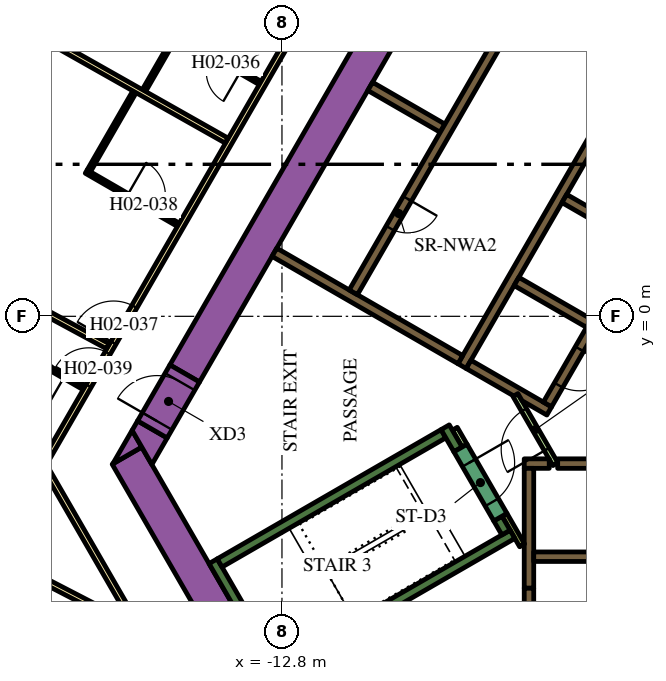
"""IFC4 building model, lengths in metres.
Left out: names, types, materials, properties, quantities, classifications, styles, units other than length and angle.
Written with IfcOpenShell. Run it as: python <this file> out.ifc"""

import sys

from ifc_helpers import new_model, si_unit, direction, frame, frame_2d, origin, place, context, subcontext, project, spatial, polyline, rectangle, outline, extrude, element, fill, save


model = new_model("IFC4")
c1 = context("Model", 3, precision=1e-05, world=origin(), true_north=direction((0.0, 1.0)))
c2 = subcontext(c1, "Body", "Model", "MODEL_VIEW")
j1 = project(units=[si_unit("LENGTHUNIT", "METRE"), si_unit("PLANEANGLEUNIT", "RADIAN")], contexts=[c1])
p1 = place(None, origin())
s1 = spatial("IfcSite", under=j1, at=p1, CompositionType="ELEMENT")
p2 = place(p1, origin())
s2 = spatial("IfcBuilding", under=s1, at=p2, CompositionType="ELEMENT")
p3 = place(p2, frame((0.0, 0.0, 39.3)))
s3 = spatial("IfcBuildingStorey", under=s2, at=p3, CompositionType="ELEMENT", Elevation=39.3)
p4 = place(p3, frame((-15.36, -1.503, 0.0), z_axis=(0.0, 0.0, 1.0), x_axis=(0.50000389221, 0.866023156604, 0.0)))
e1 = element("IfcWall", 1, at=p4, inside=s3, PredefinedType="SOLIDWALL", context=c2, shape_type="SweptSolid", body=[
    extrude(rectangle(XDim=21.0, YDim=0.9, at=frame_2d((10.5, 0.0))), origin(), (0.0, 0.0, 1.0), 3.9),
])
p5 = place(p3, frame((-12.134, -11.883, 0.0), z_axis=(0.0, 0.0, 1.0), x_axis=(-0.500005339912, 0.866022320763, 0.0)))
e2 = element("IfcWall", 2, at=p5, inside=s3, PredefinedType="SOLIDWALL", context=c2, shape_type="SweptSolid", body=[
    extrude(rectangle(XDim=9.488, YDim=0.9, at=frame_2d((4.744, 0.0))), origin(), (0.0, 0.0, 1.0), 3.9),
])
p6 = place(p3, origin())
e3 = element("IfcWall", 3, at=p6, inside=s3, PredefinedType="SOLIDWALL", context=c2, shape_type="SweptSolid", body=[
    extrude(outline(polyline([(-16.489, -3.44), (-17.251, -3.88), (-16.743, -3.0), (-16.489, -3.44)])), origin(), (0.0, 0.0, 1.0), 3.9),
])
e4 = element("IfcWall", 4, at=p6, inside=s3, PredefinedType="SOLIDWALL", context=c2, shape_type="SweptSolid", body=[
    extrude(outline(polyline([(-15.82, -3.201), (-16.223, -3.9), (-16.743, -3.0), (-16.599, -2.751), (-15.82, -3.201)])), origin(), (0.0, 0.0, 1.0), 3.9),
])
p7 = place(p3, frame((-12.885, -9.431, 0.0), z_axis=(0.0, 0.0, 1.0), x_axis=(-0.500020560727, 0.866013532718, 0.0)))
e5 = element("IfcWall", 5, at=p7, inside=s3, PredefinedType="SOLIDWALL", context=c2, shape_type="SweptSolid", body=[
    extrude(rectangle(XDim=3.45, YDim=0.25, at=frame_2d((1.725, 0.0))), origin(), (0.0, 0.0, 1.0), 3.9),
])
p8 = place(p3, frame((-14.44, -6.49, 0.0), z_axis=(0.0, 0.0, 1.0), x_axis=(0.866022966069, 0.500004222222, 0.0)))
e6 = element("IfcWall", 6, at=p8, inside=s3, PredefinedType="SOLIDWALL", context=c2, shape_type="SweptSolid", body=[
    extrude(rectangle(XDim=6.8, YDim=0.25, at=frame_2d((3.4, 0.0))), origin(), (0.0, 0.0, 1.0), 3.9),
])
p9 = place(p3, frame((-8.168, -3.503, 0.0), z_axis=(0.0, 0.0, 1.0), x_axis=(-0.499952099219, 0.866053057547, 0.0)))
e7 = element("IfcWall", 7, at=p9, inside=s3, PredefinedType="SOLIDWALL", context=c2, shape_type="SweptSolid", body=[
    extrude(rectangle(XDim=0.675, YDim=0.25, at=frame_2d((0.337, 0.0))), origin(), (0.0, 0.0, 1.0), 3.9),
])
p10 = place(p3, frame((-12.84, -9.261, 0.0), z_axis=(0.0, 0.0, 1.0), x_axis=(0.866016039709, 0.500016218704, 0.0)))
e8 = element("IfcWall", 8, at=p10, inside=s3, PredefinedType="SOLIDWALL", context=c2, shape_type="SweptSolid", body=[
    extrude(rectangle(XDim=7.05, YDim=0.25, at=frame_2d((3.525, 0.0))), origin(), (0.0, 0.0, 1.0), 3.9),
])
p11 = place(p3, frame((-6.905, -5.69, 0.0), z_axis=(0.0, 0.0, 1.0), x_axis=(-0.500402024738, 0.865793170242, 0.0)))
e9 = element("IfcWall", 9, at=p11, inside=s3, PredefinedType="SOLIDWALL", context=c2, shape_type="SweptSolid", body=[
    extrude(rectangle(XDim=0.425, YDim=0.25, at=frame_2d((0.212, 0.0))), origin(), (0.0, 0.0, 1.0), 3.9),
])
p12 = place(p3, frame((-5.545, -3.875, 0.0), z_axis=(0.0, 0.0, 1.0), x_axis=(1.0, 0.0, 0.0)))
e10 = element("IfcWall", 10, at=p12, inside=s3, PredefinedType="SOLIDWALL", context=c2, shape_type="SweptSolid", body=[
    extrude(rectangle(XDim=11.97, YDim=0.25, at=frame_2d((5.985, 0.0))), origin(), (0.0, 0.0, 1.0), 3.9),
])
p13 = place(p3, frame((-6.425, -3.875, 0.0), z_axis=(0.0, 0.0, 1.0), x_axis=(1.0, 0.0, 0.0)))
e11 = element("IfcWall", 11, at=p13, inside=s3, PredefinedType="SOLIDWALL", context=c2, shape_type="SweptSolid", body=[
    extrude(rectangle(XDim=0.658, YDim=0.25, at=frame_2d((0.329, 0.0))), origin(), (0.0, 0.0, 1.0), 3.9),
])
p14 = place(p3, frame((-6.3, -4.0, 0.0), z_axis=(0.0, 0.0, 1.0), x_axis=(0.0, -1.0, 0.0)))
e12 = element("IfcWall", 12, at=p14, inside=s3, PredefinedType="SOLIDWALL", context=c2, shape_type="SweptSolid", body=[
    extrude(rectangle(XDim=3.154, YDim=0.25, at=frame_2d((1.577, 0.0))), origin(), (0.0, 0.0, 1.0), 3.9),
])
p15 = place(p3, frame((-8.06, -1.311, 0.0), z_axis=(0.0, 0.0, 1.0), x_axis=(0.50000273126, 0.866023826885, 0.0)))
e13 = element("IfcWall", 13, at=p15, inside=s3, PredefinedType="SOLIDWALL", context=c2, shape_type="SweptSolid", body=[
    extrude(rectangle(XDim=10.33, YDim=0.25, at=frame_2d((5.165, 0.0))), origin(), (0.0, 0.0, 1.0), 3.9),
])
for number, where, z_axis, x_axis in (
    (14, (-5.369, 3.1, 0.0), (0.0, 0.0, 1.0), (0.866, -0.5, 0.0)),
    (15, (-4.724, -0.182, 0.0), (0.0, 0.0, 1.0), (-0.866, 0.5, 0.0)),
):
    element("IfcWall", number, at=place(p3, frame(where, z_axis=z_axis, x_axis=x_axis)), inside=s3, PredefinedType="SOLIDWALL", context=c2, shape_type="SweptSolid", body=[
        extrude(rectangle(XDim=2.2, YDim=0.25, at=frame_2d((1.1, 0.0))), origin(), (0.0, 0.0, 1.0), 3.9),
    ])
e16 = element("IfcWall", 16, at=p6, inside=s3, PredefinedType="SOLIDWALL", context=c2, shape_type="SweptSolid", body=[
    extrude(outline(polyline([(-5.922, -2.257), (-5.922, -2.257), (-5.705, -2.382), (-5.83, -2.598), (-6.483, -2.221), (-6.591, -2.033), (-6.591, -2.033), (-6.7, -2.096), (-7.952, -1.373), (-7.827, -1.156), (-5.922, -2.257)])), origin(), (0.0, 0.0, 1.0), 3.9),
])
p16 = place(p3, frame((-8.106, -1.14, 0.0), z_axis=(0.0, 0.0, 1.0), x_axis=(-0.866000643155, 0.500042884217, 0.0)))
e17 = element("IfcWall", 17, at=p16, inside=s3, PredefinedType="SOLIDWALL", context=c2, shape_type="SweptSolid", body=[
    extrude(rectangle(XDim=5.65, YDim=0.25, at=frame_2d((2.825, 0.0))), origin(), (0.0, 0.0, 1.0), 3.9),
])
p17 = place(p3, frame((-8.574, 4.95, 0.0), z_axis=(0.0, 0.0, 1.0), x_axis=(-0.866008176907, 0.50002983664, 0.0)))
e18 = element("IfcWall", 18, at=p17, inside=s3, PredefinedType="SOLIDWALL", context=c2, shape_type="SweptSolid", body=[
    extrude(rectangle(XDim=2.2, YDim=0.25, at=frame_2d((1.1, 0.0))), origin(), (0.0, 0.0, 1.0), 3.9),
])
p18 = place(p3, frame((-6.48, -6.027, 0.0), z_axis=(0.0, 0.0, 1.0), x_axis=(-0.499927229454, 0.866067413802, 0.0)))
e19 = element("IfcWall", 19, at=p18, inside=s3, PredefinedType="PARTITIONING", context=c2, shape_type="SweptSolid", body=[
    extrude(rectangle(XDim=0.929, YDim=0.15, at=frame_2d((0.464, 0.0))), origin(), (0.0, 0.0, 1.0), 3.9),
])
p19 = place(p3, frame((-8.252, -2.958, 0.0), z_axis=(0.0, 0.0, 1.0), x_axis=(0.500174715838, -0.865924508047, 0.0)))
e20 = element("IfcWall", 20, at=p19, inside=s3, PredefinedType="PARTITIONING", context=c2, shape_type="SweptSolid", body=[
    extrude(rectangle(XDim=0.514, YDim=0.15, at=frame_2d((0.257, 0.0))), origin(), (0.0, 0.0, 1.0), 2.75),
])
p20 = place(p3, frame((-6.175, -6.325, 0.0), z_axis=(0.0, 0.0, 1.0), x_axis=(1.0, 0.0, 0.0)))
e21 = element("IfcWall", 21, at=p20, inside=s3, PredefinedType="SOLIDWALL", context=c2, shape_type="SweptSolid", body=[
    extrude(rectangle(XDim=12.35, YDim=0.25, at=frame_2d((6.175, 0.0))), origin(), (0.0, 0.0, 1.0), 3.9),
])
p21 = place(p20, frame((3.205, 0.0, 0.0)))
e22 = element("IfcOpeningElement", 22, at=p21, cuts=e21, PredefinedType="OPENING", context=c2, shape_type="SweptSolid", body=[
    extrude(rectangle(XDim=0.9, YDim=2.1, at=frame_2d((0.45, 1.05))), frame((0.0, 0.135, 0.0), z_axis=(0.0, -1.0, 0.0), x_axis=(1.0, 0.0, 0.0)), (0.0, 0.0, 1.0), 0.27),
])
p22 = place(p20, frame((8.145, 0.0, 0.0)))
e23 = element("IfcOpeningElement", 23, at=p22, cuts=e21, PredefinedType="OPENING", context=c2, shape_type="SweptSolid", body=[
    extrude(rectangle(XDim=1.1, YDim=2.1, at=frame_2d((0.55, 1.05))), frame((0.0, 0.135, 0.0), z_axis=(0.0, -1.0, 0.0), x_axis=(1.0, 0.0, 0.0)), (0.0, 0.0, 1.0), 0.27),
])
p23 = place(p20, frame((10.665, 0.0, 0.0)))
e24 = element("IfcOpeningElement", 24, at=p23, cuts=e21, PredefinedType="OPENING", context=c2, shape_type="SweptSolid", body=[
    extrude(rectangle(XDim=1.1, YDim=2.1, at=frame_2d((0.55, 1.05))), frame((0.0, 0.135, 0.0), z_axis=(0.0, -1.0, 0.0), x_axis=(1.0, 0.0, 0.0)), (0.0, 0.0, 1.0), 0.27),
])
p24 = place(p3, frame((-6.008, 9.144, 0.0), z_axis=(0.0, 0.0, 1.0), x_axis=(-0.500006956611, -0.866021387346, 0.0)))
e25 = element("IfcWall", 25, at=p24, inside=s3, PredefinedType="SOLIDWALL", context=c2, shape_type="SweptSolid", body=[
    extrude(rectangle(XDim=9.83, YDim=0.25, at=frame_2d((4.915, 0.0))), origin(), (0.0, 0.0, 1.0), 3.9),
])
p25 = place(p24, frame((6.985, 0.0, 0.0)))
e26 = element("IfcOpeningElement", 26, at=p25, cuts=e25, PredefinedType="OPENING", context=c2, shape_type="SweptSolid", body=[
    extrude(rectangle(XDim=0.9, YDim=2.1, at=frame_2d((0.45, 1.05))), frame((0.0, 0.135, 0.0), z_axis=(0.0, -1.0, 0.0), x_axis=(1.0, 0.0, 0.0)), (0.0, 0.0, 1.0), 0.27),
])
p26 = place(p3, frame((-0.898, 6.194, 0.0), z_axis=(0.0, 0.0, 1.0), x_axis=(-0.499996202215, -0.866027596426, 0.0)))
e27 = element("IfcWall", 27, at=p26, inside=s3, PredefinedType="SOLIDWALL", context=c2, shape_type="SweptSolid", body=[
    extrude(rectangle(XDim=9.83, YDim=0.25, at=frame_2d((4.915, 0.0))), origin(), (0.0, 0.0, 1.0), 3.9),
])
p27 = place(p26, frame((0.585, 0.0, 0.0)))
e28 = element("IfcOpeningElement", 28, at=p27, cuts=e27, PredefinedType="OPENING", context=c2, shape_type="SweptSolid", body=[
    extrude(rectangle(XDim=1.1, YDim=2.1, at=frame_2d((0.55, 1.05))), frame((0.0, 0.135, 0.0), z_axis=(0.0, -1.0, 0.0), x_axis=(1.0, 0.0, 0.0)), (0.0, 0.0, 1.0), 0.27),
])
p28 = place(p26, frame((3.105, 0.0, 0.0)))
e29 = element("IfcOpeningElement", 29, at=p28, cuts=e27, PredefinedType="OPENING", context=c2, shape_type="SweptSolid", body=[
    extrude(rectangle(XDim=1.1, YDim=2.1, at=frame_2d((0.55, 1.05))), frame((0.0, 0.135, 0.0), z_axis=(0.0, -1.0, 0.0), x_axis=(1.0, 0.0, 0.0)), (0.0, 0.0, 1.0), 0.27),
])
p29 = place(p26, frame((5.625, 0.0, 0.0)))
e30 = element("IfcOpeningElement", 30, at=p29, cuts=e27, PredefinedType="OPENING", context=c2, shape_type="SweptSolid", body=[
    extrude(rectangle(XDim=1.1, YDim=2.1, at=frame_2d((0.55, 1.05))), frame((0.0, 0.135, 0.0), z_axis=(0.0, -1.0, 0.0), x_axis=(1.0, 0.0, 0.0)), (0.0, 0.0, 1.0), 0.27),
])
p30 = place(p26, frame((8.145, 0.0, 0.0)))
e31 = element("IfcOpeningElement", 31, at=p30, cuts=e27, PredefinedType="OPENING", context=c2, shape_type="SweptSolid", body=[
    extrude(rectangle(XDim=1.1, YDim=2.1, at=frame_2d((0.55, 1.05))), frame((0.0, 0.135, 0.0), z_axis=(0.0, -1.0, 0.0), x_axis=(1.0, 0.0, 0.0)), (0.0, 0.0, 1.0), 0.27),
])
p31 = place(p3, frame((-8.103, -3.466, 0.0), z_axis=(0.0, 0.0, 1.0), x_axis=(0.500078061341, -0.865980330357, 0.0)))
e32 = element("IfcWall", 32, at=p31, inside=s3, PredefinedType="SOLIDWALL", context=c2, shape_type="SweptSolid", body=[
    extrude(rectangle(XDim=2.1, YDim=0.4, at=frame_2d((1.05, 0.0))), origin(), (0.0, 0.0, 1.0), 3.9),
])
p32 = place(p31, frame((0.45, 0.0, 0.0)))
e33 = element("IfcOpeningElement", 33, at=p32, cuts=e32, PredefinedType="OPENING", context=c2, shape_type="SweptSolid", body=[
    extrude(rectangle(XDim=1.2, YDim=2.1, at=frame_2d((0.6, 1.05))), frame((0.0, 0.21, 0.0), z_axis=(0.0, -1.0, 0.0), x_axis=(1.0, 0.0, 0.0)), (0.0, 0.0, 1.0), 0.42),
])
p33 = place(p3, frame((-6.3, -7.154, 0.0), z_axis=(0.0, 0.0, 1.0), x_axis=(0.0, -1.0, 0.0)))
e34 = element("IfcWall", 34, at=p33, inside=s3, PredefinedType="SOLIDWALL", context=c2, shape_type="SweptSolid", body=[
    extrude(rectangle(XDim=1.8, YDim=0.25, at=frame_2d((0.9, 0.0))), origin(), (0.0, 0.0, 1.0), 3.9),
])
p34 = place(p33, frame((0.45, 0.0, 0.0)))
e35 = element("IfcOpeningElement", 35, at=p34, cuts=e34, PredefinedType="OPENING", context=c2, shape_type="SweptSolid", body=[
    extrude(rectangle(XDim=0.9, YDim=2.1, at=frame_2d((0.45, 1.05))), frame((0.0, 0.135, 0.0), z_axis=(0.0, -1.0, 0.0), x_axis=(1.0, 0.0, 0.0)), (0.0, 0.0, 1.0), 0.27),
])
p35 = place(p3, frame((-5.606, -3.89, 0.0), z_axis=(0.0, 0.0, 1.0), x_axis=(-0.500027713859, 0.866009402589, 0.0)))
e36 = element("IfcWall", 36, at=p35, inside=s3, PredefinedType="PARTITIONING", context=c2, shape_type="SweptSolid", body=[
    extrude(rectangle(XDim=2.1, YDim=0.15, at=frame_2d((1.05, 0.0))), origin(), (0.0, 0.0, 1.0), 2.75),
])
p36 = place(p35, frame((0.45, 0.0, 0.0)))
e37 = element("IfcOpeningElement", 37, at=p36, cuts=e36, PredefinedType="OPENING", context=c2, shape_type="SweptSolid", body=[
    extrude(rectangle(XDim=1.2, YDim=2.1, at=frame_2d((0.6, 1.05))), frame((0.0, 0.085, 0.0), z_axis=(0.0, -1.0, 0.0), x_axis=(1.0, 0.0, 0.0)), (0.0, 0.0, 1.0), 0.17),
])
p37 = place(p3, frame((-16.209, -2.976, 0.0), z_axis=(0.0, 0.0, 1.0), x_axis=(0.499954529098, 0.86605165483, 0.0)))
e38 = element("IfcWall", 38, at=p37, inside=s3, PredefinedType="SOLIDWALL", context=c2, shape_type="SweptSolid", body=[
    extrude(rectangle(XDim=1.7, YDim=0.9, at=frame_2d((0.85, 0.0))), origin(), (0.0, 0.0, 1.0), 3.9),
])
p38 = place(p37, frame((0.25, 0.0, 0.0)))
e39 = element("IfcOpeningElement", 39, at=p38, cuts=e38, PredefinedType="OPENING", context=c2, shape_type="SweptSolid", body=[
    extrude(rectangle(XDim=1.2, YDim=2.1, at=frame_2d((0.6, 1.05))), frame((0.0, 0.46, 0.0), z_axis=(0.0, -1.0, 0.0), x_axis=(1.0, 0.0, 0.0)), (0.0, 0.0, 1.0), 0.92),
])
p39 = place(p3, frame((-19.081, -3.9, 0.0), z_axis=(0.0, 0.0, 1.0), x_axis=(0.499998313975, 0.866026377209, 0.0)))
e40 = element("IfcWall", 40, at=p39, inside=s3, PredefinedType="PARTITIONING", context=c2, shape_type="SweptSolid", body=[
    extrude(rectangle(XDim=25.766, YDim=0.15, at=frame_2d((12.883, 0.0))), origin(), (0.0, 0.0, 1.0), 2.75),
])
p40 = place(p39, frame((16.196, 0.0, 0.0)))
e41 = element("IfcOpeningElement", 41, at=p40, cuts=e40, PredefinedType="OPENING", context=c2, shape_type="SweptSolid", body=[
    extrude(rectangle(XDim=1.0, YDim=2.1, at=frame_2d((0.5, 1.05))), frame((0.0, 0.085, 0.0), z_axis=(0.0, -1.0, 0.0), x_axis=(1.0, 0.0, 0.0)), (0.0, 0.0, 1.0), 0.17),
])
p41 = place(p39, frame((14.889, 0.0, 0.0)))
e42 = element("IfcOpeningElement", 42, at=p41, cuts=e40, PredefinedType="OPENING", context=c2, shape_type="SweptSolid", body=[
    extrude(rectangle(XDim=1.0, YDim=2.1, at=frame_2d((0.5, 1.05))), frame((0.0, 0.085, 0.0), z_axis=(0.0, -1.0, 0.0), x_axis=(1.0, 0.0, 0.0)), (0.0, 0.0, 1.0), 0.17),
])
p42 = place(p39, frame((3.698, 0.0, 0.0)))
e43 = element("IfcOpeningElement", 43, at=p42, cuts=e40, PredefinedType="OPENING", context=c2, shape_type="SweptSolid", body=[
    extrude(rectangle(XDim=1.1, YDim=2.1, at=frame_2d((0.55, 1.05))), frame((0.0, 0.085, 0.0), z_axis=(0.0, -1.0, 0.0), x_axis=(1.0, 0.0, 0.0)), (0.0, 0.0, 1.0), 0.17),
])
p43 = place(p39, frame((2.392, 0.0, 0.0)))
e44 = element("IfcOpeningElement", 44, at=p43, cuts=e40, PredefinedType="OPENING", context=c2, shape_type="SweptSolid", body=[
    extrude(rectangle(XDim=1.0, YDim=2.1, at=frame_2d((0.5, 1.05))), frame((0.0, 0.085, 0.0), z_axis=(0.0, -1.0, 0.0), x_axis=(1.0, 0.0, 0.0)), (0.0, 0.0, 1.0), 0.17),
])
p44 = place(p3, frame((-16.412, -8.523, 0.0), z_axis=(0.0, 0.0, 1.0), x_axis=(-0.500001929737, 0.866024289647, 0.0)))
e45 = element("IfcWall", 45, at=p44, inside=s3, PredefinedType="PARTITIONING", context=c2, shape_type="SweptSolid", body=[
    extrude(rectangle(XDim=5.268, YDim=0.15, at=frame_2d((2.634, 0.0))), origin(), (0.0, 0.0, 1.0), 2.75),
])
p45 = place(p3, frame((-24.145, 2.871, 0.0), z_axis=(0.0, 0.0, 1.0), x_axis=(0.879551725039, -0.475803281809, 0.0)))
e46 = element("IfcWall", 46, at=p45, inside=s3, PredefinedType="PARTITIONING", context=c2, shape_type="SweptSolid", body=[
    extrude(rectangle(XDim=7.688, YDim=0.15, at=frame_2d((3.844, 0.0))), origin(), (0.0, 0.0, 1.0), 2.75),
])
p46 = place(p3, frame((-27.134, -2.779, 0.0), z_axis=(0.0, 0.0, 1.0), x_axis=(0.8882049501, -0.459447457951, 0.0)))
e47 = element("IfcWall", 47, at=p46, inside=s3, PredefinedType="PARTITIONING", context=c2, shape_type="SweptSolid", body=[
    extrude(rectangle(XDim=11.638, YDim=0.15, at=frame_2d((5.819, 0.0))), origin(), (0.0, 0.0, 1.0), 2.75),
])
p47 = place(p3, frame((-21.052, 8.464, 0.0), z_axis=(0.0, 0.0, 1.0), x_axis=(0.87059371954, -0.492002617368, 0.0)))
e48 = element("IfcWall", 48, at=p47, inside=s3, PredefinedType="PARTITIONING", context=c2, shape_type="SweptSolid", body=[
    extrude(rectangle(XDim=7.803, YDim=0.15, at=frame_2d((3.902, 0.0))), origin(), (0.0, 0.0, 1.0), 2.75),
])
p48 = place(p3, frame((-13.373, 6.138, 0.0), z_axis=(0.0, 0.0, 1.0), x_axis=(-0.866062058628, 0.499936506574, 0.0)))
e49 = element("IfcWall", 49, at=p48, inside=s3, PredefinedType="PARTITIONING", context=c2, shape_type="SweptSolid", body=[
    extrude(rectangle(XDim=2.6, YDim=0.1, at=frame_2d((1.3, 0.0))), origin(), (0.0, 0.0, 1.0), 2.75),
])
p49 = place(p48, frame((0.6, 0.0, 0.0)))
e50 = element("IfcOpeningElement", 50, at=p49, cuts=e49, PredefinedType="OPENING", context=c2, shape_type="SweptSolid", body=[
    extrude(rectangle(XDim=0.9, YDim=2.1, at=frame_2d((0.45, 1.05))), frame((0.0, 0.06, 0.0), z_axis=(0.0, -1.0, 0.0), x_axis=(1.0, 0.0, 0.0)), (0.0, 0.0, 1.0), 0.12),
])
p50 = place(p3, frame((-15.606, 7.37, 0.0), z_axis=(0.0, 0.0, 1.0), x_axis=(-0.499974350878, -0.866040211805, 0.0)))
e51 = element("IfcWall", 51, at=p50, inside=s3, PredefinedType="PARTITIONING", context=c2, shape_type="SweptSolid", body=[
    extrude(rectangle(XDim=1.65, YDim=0.1, at=frame_2d((0.825, 0.0))), origin(), (0.0, 0.0, 1.0), 2.75),
])
p51 = place(p3, frame((-17.951, 3.808, 0.0), z_axis=(0.0, 0.0, 1.0), x_axis=(0.866034573852, -0.49998411664, 0.0)))
e52 = element("IfcWall", 52, at=p51, inside=s3, PredefinedType="PARTITIONING", context=c2, shape_type="SweptSolid", body=[
    extrude(rectangle(XDim=2.8, YDim=0.1, at=frame_2d((1.4, 0.0))), origin(), (0.0, 0.0, 1.0), 2.75),
])
p52 = place(p51, frame((1.25, 0.0, 0.0)))
e53 = element("IfcOpeningElement", 53, at=p52, cuts=e52, PredefinedType="OPENING", context=c2, shape_type="SweptSolid", body=[
    extrude(rectangle(XDim=1.0, YDim=2.1, at=frame_2d((0.5, 1.05))), frame((0.0, 0.06, 0.0), z_axis=(0.0, -1.0, 0.0), x_axis=(1.0, 0.0, 0.0)), (0.0, 0.0, 1.0), 0.12),
])
p53 = place(p3, frame((-17.878, 3.835, 0.0), z_axis=(0.0, 0.0, 1.0), x_axis=(0.500061428766, 0.865989934965, 0.0)))
e54 = element("IfcWall", 54, at=p53, inside=s3, PredefinedType="PARTITIONING", context=c2, shape_type="SweptSolid", body=[
    extrude(rectangle(XDim=2.39, YDim=0.1, at=frame_2d((1.195, 0.0))), origin(), (0.0, 0.0, 1.0), 2.75),
])
p54 = place(p3, frame((-18.006, -1.888, 0.0), z_axis=(0.0, 0.0, 1.0), x_axis=(-0.866036505625, 0.499980770555, 0.0)))
e55 = element("IfcWall", 55, at=p54, inside=s3, PredefinedType="PARTITIONING", context=c2, shape_type="SweptSolid", body=[
    extrude(rectangle(XDim=2.7, YDim=0.1, at=frame_2d((1.35, 0.0))), origin(), (0.0, 0.0, 1.0), 2.75),
])
p55 = place(p54, frame((0.6, 0.0, 0.0)))
e56 = element("IfcOpeningElement", 56, at=p55, cuts=e55, PredefinedType="OPENING", context=c2, shape_type="SweptSolid", body=[
    extrude(rectangle(XDim=0.9, YDim=2.1, at=frame_2d((0.45, 1.05))), frame((0.0, 0.06, 0.0), z_axis=(0.0, -1.0, 0.0), x_axis=(1.0, 0.0, 0.0)), (0.0, 0.0, 1.0), 0.12),
])
p56 = place(p25, origin())
e57 = element("IfcDoor", 57, at=p56, inside=s3, OperationType="SINGLE_SWING_LEFT", PredefinedType="DOOR", context=c2, shape_type="SweptSolid", body=[
    extrude(rectangle(XDim=0.9, YDim=2.1, at=frame_2d((0.45, 1.05))), frame((0.0, 0.025, 0.0), z_axis=(0.0, -1.0, 0.0), x_axis=(1.0, 0.0, 0.0)), (0.0, 0.0, 1.0), 0.05),
])
fill(e26, e57)
p57 = place(p30, origin())
e58 = element("IfcDoor", 58, at=p57, inside=s3, OperationType="DOUBLE_DOOR_SLIDING", PredefinedType="DOOR", context=c2, shape_type="SweptSolid", body=[
    extrude(rectangle(XDim=1.1, YDim=2.1, at=frame_2d((0.55, 1.05))), frame((0.0, 0.025, 0.0), z_axis=(0.0, -1.0, 0.0), x_axis=(1.0, 0.0, 0.0)), (0.0, 0.0, 1.0), 0.05),
])
fill(e31, e58)
p58 = place(p32, origin())
e59 = element("IfcDoor", 59, at=p58, inside=s3, OperationType="SINGLE_SWING_LEFT", PredefinedType="DOOR", context=c2, shape_type="SweptSolid", body=[
    extrude(rectangle(XDim=1.2, YDim=2.1, at=frame_2d((0.6, 1.05))), frame((0.0, 0.025, 0.0), z_axis=(0.0, -1.0, 0.0), x_axis=(1.0, 0.0, 0.0)), (0.0, 0.0, 1.0), 0.05),
])
fill(e33, e59)
p59 = place(p36, origin())
e60 = element("IfcDoor", 60, at=p59, inside=s3, OperationType="SINGLE_SWING_LEFT", PredefinedType="DOOR", context=c2, shape_type="SweptSolid", body=[
    extrude(rectangle(XDim=1.2, YDim=2.1, at=frame_2d((0.6, 1.05))), frame((0.0, 0.025, 0.0), z_axis=(0.0, -1.0, 0.0), x_axis=(1.0, 0.0, 0.0)), (0.0, 0.0, 1.0), 0.05),
])
fill(e37, e60)
p60 = place(p38, origin())
e61 = element("IfcDoor", 61, at=p60, inside=s3, OperationType="SINGLE_SWING_LEFT", PredefinedType="DOOR", context=c2, shape_type="SweptSolid", body=[
    extrude(rectangle(XDim=1.2, YDim=2.1, at=frame_2d((0.6, 1.05))), frame((0.0, 0.025, 0.0), z_axis=(0.0, -1.0, 0.0), x_axis=(1.0, 0.0, 0.0)), (0.0, 0.0, 1.0), 0.05),
])
fill(e39, e61)
p61 = place(p49, origin())
e62 = element("IfcDoor", 62, at=p61, inside=s3, OperationType="SINGLE_SWING_LEFT", PredefinedType="DOOR", context=c2, shape_type="SweptSolid", body=[
    extrude(rectangle(XDim=0.9, YDim=2.1, at=frame_2d((0.45, 1.05))), frame((0.0, 0.025, 0.0), z_axis=(0.0, -1.0, 0.0), x_axis=(1.0, 0.0, 0.0)), (0.0, 0.0, 1.0), 0.05),
])
fill(e50, e62)
p62 = place(p42, origin())
e63 = element("IfcDoor", 63, at=p62, inside=s3, OperationType="SINGLE_SWING_LEFT", PredefinedType="DOOR", context=c2, shape_type="SweptSolid", body=[
    extrude(rectangle(XDim=1.1, YDim=2.1, at=frame_2d((0.55, 1.05))), frame((0.0, 0.025, 0.0), z_axis=(0.0, -1.0, 0.0), x_axis=(1.0, 0.0, 0.0)), (0.0, 0.0, 1.0), 0.05),
])
fill(e43, e63)
p63 = place(p52, origin())
e64 = element("IfcDoor", 64, at=p63, inside=s3, OperationType="SINGLE_SWING_LEFT", PredefinedType="DOOR", context=c2, shape_type="SweptSolid", body=[
    extrude(rectangle(XDim=1.0, YDim=2.1, at=frame_2d((0.5, 1.05))), frame((0.0, 0.025, 0.0), z_axis=(0.0, -1.0, 0.0), x_axis=(1.0, 0.0, 0.0)), (0.0, 0.0, 1.0), 0.05),
])
fill(e53, e64)
p64 = place(p43, origin())
e65 = element("IfcDoor", 65, at=p64, inside=s3, OperationType="SINGLE_SWING_RIGHT", PredefinedType="DOOR", context=c2, shape_type="SweptSolid", body=[
    extrude(rectangle(XDim=1.0, YDim=2.1, at=frame_2d((0.5, 1.05))), frame((0.0, 0.025, 0.0), z_axis=(0.0, -1.0, 0.0), x_axis=(1.0, 0.0, 0.0)), (0.0, 0.0, 1.0), 0.05),
])
fill(e44, e65)
p65 = place(p55, origin())
e66 = element("IfcDoor", 66, at=p65, inside=s3, OperationType="SINGLE_SWING_RIGHT", PredefinedType="DOOR", context=c2, shape_type="SweptSolid", body=[
    extrude(rectangle(XDim=0.9, YDim=2.1, at=frame_2d((0.45, 1.05))), frame((0.0, 0.025, 0.0), z_axis=(0.0, -1.0, 0.0), x_axis=(1.0, 0.0, 0.0)), (0.0, 0.0, 1.0), 0.05),
])
fill(e56, e66)
save(model, sys.argv[1])
